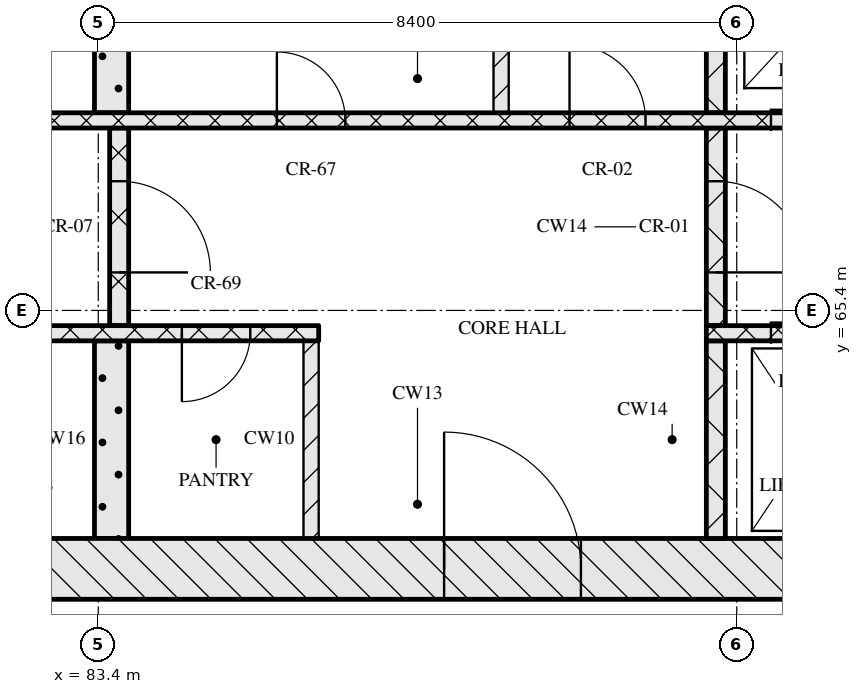
"""IFC4 building model, lengths in metres.
Left out: names, types, materials, properties, quantities, classifications, styles, units other than length and angle.
Written with IfcOpenShell. Run it as: python <this file> out.ifc"""

import sys

from ifc_helpers import new_model, si_unit, direction, frame, frame_2d, origin, place, context, subcontext, project, spatial, rectangle, extrude, element, fill, save


model = new_model("IFC4")
c1 = context("Model", 3, precision=1e-05, world=origin(), true_north=direction((0.0, 1.0)))
c2 = subcontext(c1, "Body", "Model", "MODEL_VIEW")
j1 = project(units=[si_unit("LENGTHUNIT", "METRE"), si_unit("PLANEANGLEUNIT", "RADIAN")], contexts=[c1])
p1 = place(None, origin())
s1 = spatial("IfcSite", under=j1, at=p1, CompositionType="ELEMENT")
p2 = place(p1, origin())
s2 = spatial("IfcBuilding", under=s1, at=p2, CompositionType="ELEMENT")
p3 = place(p2, frame((0.0, 0.0, 190.65)))
s3 = spatial("IfcBuildingStorey", under=s2, at=p3, CompositionType="ELEMENT", Elevation=190.65)
p4 = place(p3, frame((67.0, 62.0, 0.0), z_axis=(0.0, 0.0, 1.0), x_axis=(1.0, 0.0, 0.0)))
e1 = element("IfcWall", 1, at=p4, inside=s3, PredefinedType="SOLIDWALL", context=c2, shape_type="SweptSolid", body=[
    extrude(rectangle(XDim=41.2, YDim=0.8, at=frame_2d((20.6, 0.0))), origin(), (0.0, 0.0, 1.0), 3.3),
])
p5 = place(p4, frame((20.95, 0.0, 0.0)))
e2 = element("IfcOpeningElement", 2, at=p5, cuts=e1, PredefinedType="OPENING", context=c2, shape_type="SweptSolid", body=[
    extrude(rectangle(XDim=1.8, YDim=2.1, at=frame_2d((0.9, 1.05))), frame((0.0, 0.41, 0.0), z_axis=(0.0, -1.0, 0.0), x_axis=(1.0, 0.0, 0.0)), (0.0, 0.0, 1.0), 0.82),
])
p6 = place(p3, frame((83.575, 62.4, 0.0), z_axis=(0.0, 0.0, 1.0), x_axis=(0.0, 1.0, 0.0)))
e3 = element("IfcWall", 3, at=p6, inside=s3, PredefinedType="SOLIDWALL", context=c2, shape_type="SweptSolid", body=[
    extrude(rectangle(XDim=2.6, YDim=0.45, at=frame_2d((1.3, 0.0))), origin(), (0.0, 0.0, 1.0), 3.3),
])
p7 = place(p3, frame((86.2, 62.4, 0.0), z_axis=(0.0, 0.0, 1.0), x_axis=(0.0, 1.0, 0.0)))
e4 = element("IfcWall", 4, at=p7, inside=s3, PredefinedType="PARTITIONING", context=c2, shape_type="SweptSolid", body=[
    extrude(rectangle(XDim=2.6, YDim=0.2, at=frame_2d((1.3, 0.0))), origin(), (0.0, 0.0, 1.0), 3.3),
])
p8 = place(p3, frame((91.525, 62.4, 0.0), z_axis=(0.0, 0.0, 1.0), x_axis=(0.0, 1.0, 0.0)))
e5 = element("IfcWall", 5, at=p8, inside=s3, PredefinedType="SOLIDWALL", context=c2, shape_type="SweptSolid", body=[
    extrude(rectangle(XDim=2.6, YDim=0.25, at=frame_2d((1.3, 0.0))), origin(), (0.0, 0.0, 1.0), 3.3),
])
p9 = place(p3, frame((67.8, 65.1, 0.0), z_axis=(0.0, 0.0, 1.0), x_axis=(1.0, 0.0, 0.0)))
e6 = element("IfcWall", 6, at=p9, inside=s3, PredefinedType="SOLIDWALL", context=c2, shape_type="SweptSolid", body=[
    extrude(rectangle(XDim=18.5, YDim=0.2, at=frame_2d((9.25, 0.0))), origin(), (0.0, 0.0, 1.0), 3.3),
])
p10 = place(p9, frame((7.27, 0.0, 0.0)))
e7 = element("IfcOpeningElement", 7, at=p10, cuts=e6, PredefinedType="OPENING", context=c2, shape_type="SweptSolid", body=[
    extrude(rectangle(XDim=0.9, YDim=2.1, at=frame_2d((0.45, 1.05))), frame((0.0, 0.11, 0.0), z_axis=(0.0, -1.0, 0.0), x_axis=(1.0, 0.0, 0.0)), (0.0, 0.0, 1.0), 0.22),
])
p11 = place(p9, frame((8.95, 0.0, 0.0)))
e8 = element("IfcOpeningElement", 8, at=p11, cuts=e6, PredefinedType="OPENING", context=c2, shape_type="SweptSolid", body=[
    extrude(rectangle(XDim=0.9, YDim=2.1, at=frame_2d((0.45, 1.05))), frame((0.0, 0.11, 0.0), z_axis=(0.0, -1.0, 0.0), x_axis=(1.0, 0.0, 0.0)), (0.0, 0.0, 1.0), 0.22),
])
p12 = place(p9, frame((11.42, 0.0, 0.0)))
e9 = element("IfcOpeningElement", 9, at=p12, cuts=e6, PredefinedType="OPENING", context=c2, shape_type="SweptSolid", body=[
    extrude(rectangle(XDim=0.9, YDim=2.1, at=frame_2d((0.45, 1.05))), frame((0.0, 0.11, 0.0), z_axis=(0.0, -1.0, 0.0), x_axis=(1.0, 0.0, 0.0)), (0.0, 0.0, 1.0), 0.22),
])
p13 = place(p9, frame((13.92, 0.0, 0.0)))
e10 = element("IfcOpeningElement", 10, at=p13, cuts=e6, PredefinedType="OPENING", context=c2, shape_type="SweptSolid", body=[
    extrude(rectangle(XDim=0.9, YDim=2.1, at=frame_2d((0.45, 1.05))), frame((0.0, 0.11, 0.0), z_axis=(0.0, -1.0, 0.0), x_axis=(1.0, 0.0, 0.0)), (0.0, 0.0, 1.0), 0.22),
])
p14 = place(p9, frame((16.7, 0.0, 0.0)))
e11 = element("IfcOpeningElement", 11, at=p14, cuts=e6, PredefinedType="OPENING", context=c2, shape_type="SweptSolid", body=[
    extrude(rectangle(XDim=0.9, YDim=2.1, at=frame_2d((0.45, 1.05))), frame((0.0, 0.11, 0.0), z_axis=(0.0, -1.0, 0.0), x_axis=(1.0, 0.0, 0.0)), (0.0, 0.0, 1.0), 0.22),
])
p15 = place(p3, frame((91.4, 65.1, 0.0), z_axis=(0.0, 0.0, 1.0), x_axis=(1.0, 0.0, 0.0)))
e12 = element("IfcWall", 12, at=p15, inside=s3, PredefinedType="SOLIDWALL", context=c2, shape_type="SweptSolid", body=[
    extrude(rectangle(XDim=16.0, YDim=0.2, at=frame_2d((8.0, 0.0))), origin(), (0.0, 0.0, 1.0), 3.3),
])
p16 = place(p15, frame((0.85, 0.0, 0.0)))
e13 = element("IfcOpeningElement", 13, at=p16, cuts=e12, PredefinedType="OPENING", context=c2, shape_type="SweptSolid", body=[
    extrude(rectangle(XDim=1.1, YDim=2.1, at=frame_2d((0.55, 1.05))), frame((0.0, 0.11, 0.0), z_axis=(0.0, -1.0, 0.0), x_axis=(1.0, 0.0, 0.0)), (0.0, 0.0, 1.0), 0.22),
])
p17 = place(p15, frame((3.35, 0.0, 0.0)))
e14 = element("IfcOpeningElement", 14, at=p17, cuts=e12, PredefinedType="OPENING", context=c2, shape_type="SweptSolid", body=[
    extrude(rectangle(XDim=1.1, YDim=2.1, at=frame_2d((0.55, 1.05))), frame((0.0, 0.11, 0.0), z_axis=(0.0, -1.0, 0.0), x_axis=(1.0, 0.0, 0.0)), (0.0, 0.0, 1.0), 0.22),
])
p18 = place(p15, frame((5.85, 0.0, 0.0)))
e15 = element("IfcOpeningElement", 15, at=p18, cuts=e12, PredefinedType="OPENING", context=c2, shape_type="SweptSolid", body=[
    extrude(rectangle(XDim=1.1, YDim=2.1, at=frame_2d((0.55, 1.05))), frame((0.0, 0.11, 0.0), z_axis=(0.0, -1.0, 0.0), x_axis=(1.0, 0.0, 0.0)), (0.0, 0.0, 1.0), 0.22),
])
p19 = place(p15, frame((7.83, 0.0, 0.0)))
e16 = element("IfcOpeningElement", 16, at=p19, cuts=e12, PredefinedType="OPENING", context=c2, shape_type="SweptSolid", body=[
    extrude(rectangle(XDim=0.9, YDim=2.1, at=frame_2d((0.45, 1.05))), frame((0.0, 0.11, 0.0), z_axis=(0.0, -1.0, 0.0), x_axis=(1.0, 0.0, 0.0)), (0.0, 0.0, 1.0), 0.22),
])
p20 = place(p3, frame((83.675, 65.2, 0.0), z_axis=(0.0, 0.0, 1.0), x_axis=(0.0, 1.0, 0.0)))
e17 = element("IfcWall", 17, at=p20, inside=s3, PredefinedType="SOLIDWALL", context=c2, shape_type="SweptSolid", body=[
    extrude(rectangle(XDim=2.6, YDim=0.25, at=frame_2d((1.3, 0.0))), origin(), (0.0, 0.0, 1.0), 3.3),
])
p21 = place(p20, frame((0.7, 0.0, 0.0)))
e18 = element("IfcOpeningElement", 18, at=p21, cuts=e17, PredefinedType="OPENING", context=c2, shape_type="SweptSolid", body=[
    extrude(rectangle(XDim=1.2, YDim=2.1, at=frame_2d((0.6, 1.05))), frame((0.0, 0.135, 0.0), z_axis=(0.0, -1.0, 0.0), x_axis=(1.0, 0.0, 0.0)), (0.0, 0.0, 1.0), 0.27),
])
p22 = place(p3, frame((91.525, 65.2, 0.0), z_axis=(0.0, 0.0, 1.0), x_axis=(0.0, 1.0, 0.0)))
e19 = element("IfcWall", 19, at=p22, inside=s3, PredefinedType="SOLIDWALL", context=c2, shape_type="SweptSolid", body=[
    extrude(rectangle(XDim=2.6, YDim=0.25, at=frame_2d((1.3, 0.0))), origin(), (0.0, 0.0, 1.0), 3.3),
])
p23 = place(p22, frame((0.7, 0.0, 0.0)))
e20 = element("IfcOpeningElement", 20, at=p23, cuts=e19, PredefinedType="OPENING", context=c2, shape_type="SweptSolid", body=[
    extrude(rectangle(XDim=1.2, YDim=2.1, at=frame_2d((0.6, 1.05))), frame((0.0, 0.135, 0.0), z_axis=(0.0, -1.0, 0.0), x_axis=(1.0, 0.0, 0.0)), (0.0, 0.0, 1.0), 0.27),
])
p24 = place(p3, frame((76.05, 67.9, 0.0), z_axis=(0.0, 0.0, 1.0), x_axis=(1.0, 0.0, 0.0)))
e21 = element("IfcWall", 21, at=p24, inside=s3, PredefinedType="SOLIDWALL", context=c2, shape_type="SweptSolid", body=[
    extrude(rectangle(XDim=23.1, YDim=0.2, at=frame_2d((11.55, 0.0))), origin(), (0.0, 0.0, 1.0), 3.3),
])
p25 = place(p24, frame((1.95, 0.0, 0.0)))
e22 = element("IfcOpeningElement", 22, at=p25, cuts=e21, PredefinedType="OPENING", context=c2, shape_type="SweptSolid", body=[
    extrude(rectangle(XDim=0.9, YDim=2.1, at=frame_2d((0.45, 1.05))), frame((0.0, 0.11, 0.0), z_axis=(0.0, -1.0, 0.0), x_axis=(1.0, 0.0, 0.0)), (0.0, 0.0, 1.0), 0.22),
])
p26 = place(p24, frame((5.66, 0.0, 0.0)))
e23 = element("IfcOpeningElement", 23, at=p26, cuts=e21, PredefinedType="OPENING", context=c2, shape_type="SweptSolid", body=[
    extrude(rectangle(XDim=0.9, YDim=2.1, at=frame_2d((0.45, 1.05))), frame((0.0, 0.11, 0.0), z_axis=(0.0, -1.0, 0.0), x_axis=(1.0, 0.0, 0.0)), (0.0, 0.0, 1.0), 0.22),
])
p27 = place(p24, frame((9.7, 0.0, 0.0)))
e24 = element("IfcOpeningElement", 24, at=p27, cuts=e21, PredefinedType="OPENING", context=c2, shape_type="SweptSolid", body=[
    extrude(rectangle(XDim=0.9, YDim=2.1, at=frame_2d((0.45, 1.05))), frame((0.0, 0.11, 0.0), z_axis=(0.0, -1.0, 0.0), x_axis=(1.0, 0.0, 0.0)), (0.0, 0.0, 1.0), 0.22),
])
p28 = place(p24, frame((13.55, 0.0, 0.0)))
e25 = element("IfcOpeningElement", 25, at=p28, cuts=e21, PredefinedType="OPENING", context=c2, shape_type="SweptSolid", body=[
    extrude(rectangle(XDim=1.0, YDim=2.1, at=frame_2d((0.5, 1.05))), frame((0.0, 0.11, 0.0), z_axis=(0.0, -1.0, 0.0), x_axis=(1.0, 0.0, 0.0)), (0.0, 0.0, 1.0), 0.22),
])
p29 = place(p24, frame((16.2, 0.0, 0.0)))
e26 = element("IfcOpeningElement", 26, at=p29, cuts=e21, PredefinedType="OPENING", context=c2, shape_type="SweptSolid", body=[
    extrude(rectangle(XDim=1.1, YDim=2.1, at=frame_2d((0.55, 1.05))), frame((0.0, 0.11, 0.0), z_axis=(0.0, -1.0, 0.0), x_axis=(1.0, 0.0, 0.0)), (0.0, 0.0, 1.0), 0.22),
])
p30 = place(p24, frame((18.7, 0.0, 0.0)))
e27 = element("IfcOpeningElement", 27, at=p30, cuts=e21, PredefinedType="OPENING", context=c2, shape_type="SweptSolid", body=[
    extrude(rectangle(XDim=1.1, YDim=2.1, at=frame_2d((0.55, 1.05))), frame((0.0, 0.11, 0.0), z_axis=(0.0, -1.0, 0.0), x_axis=(1.0, 0.0, 0.0)), (0.0, 0.0, 1.0), 0.22),
])
p31 = place(p24, frame((21.2, 0.0, 0.0)))
e28 = element("IfcOpeningElement", 28, at=p31, cuts=e21, PredefinedType="OPENING", context=c2, shape_type="SweptSolid", body=[
    extrude(rectangle(XDim=1.1, YDim=2.1, at=frame_2d((0.55, 1.05))), frame((0.0, 0.11, 0.0), z_axis=(0.0, -1.0, 0.0), x_axis=(1.0, 0.0, 0.0)), (0.0, 0.0, 1.0), 0.22),
])
p32 = place(p3, frame((83.575, 68.0, 0.0), z_axis=(0.0, 0.0, 1.0), x_axis=(0.0, 1.0, 0.0)))
e29 = element("IfcWall", 29, at=p32, inside=s3, PredefinedType="SOLIDWALL", context=c2, shape_type="SweptSolid", body=[
    extrude(rectangle(XDim=2.6, YDim=0.45, at=frame_2d((1.3, 0.0))), origin(), (0.0, 0.0, 1.0), 3.3),
])
p33 = place(p3, frame((88.7, 68.0, 0.0), z_axis=(0.0, 0.0, 1.0), x_axis=(0.0, 1.0, 0.0)))
e30 = element("IfcWall", 30, at=p33, inside=s3, PredefinedType="PARTITIONING", context=c2, shape_type="SweptSolid", body=[
    extrude(rectangle(XDim=2.6, YDim=0.2, at=frame_2d((1.3, 0.0))), origin(), (0.0, 0.0, 1.0), 3.3),
])
p34 = place(p3, frame((91.525, 68.0, 0.0), z_axis=(0.0, 0.0, 1.0), x_axis=(0.0, 1.0, 0.0)))
e31 = element("IfcWall", 31, at=p34, inside=s3, PredefinedType="SOLIDWALL", context=c2, shape_type="SweptSolid", body=[
    extrude(rectangle(XDim=2.6, YDim=0.25, at=frame_2d((1.3, 0.0))), origin(), (0.0, 0.0, 1.0), 3.3),
])
p35 = place(p5, origin())
e32 = element("IfcDoor", 32, at=p35, inside=s3, OperationType="DOUBLE_DOOR_SINGLE_SWING", PredefinedType="DOOR", context=c2, shape_type="SweptSolid", body=[
    extrude(rectangle(XDim=1.8, YDim=2.1, at=frame_2d((0.9, 1.05))), frame((0.0, 0.025, 0.0), z_axis=(0.0, -1.0, 0.0), x_axis=(1.0, 0.0, 0.0)), (0.0, 0.0, 1.0), 0.05),
])
fill(e2, e32)
p36 = place(p14, origin())
e33 = element("IfcDoor", 33, at=p36, inside=s3, OperationType="SINGLE_SWING_RIGHT", PredefinedType="DOOR", context=c2, shape_type="SweptSolid", body=[
    extrude(rectangle(XDim=0.9, YDim=2.1, at=frame_2d((0.45, 1.05))), frame((0.0, 0.025, 0.0), z_axis=(0.0, -1.0, 0.0), x_axis=(1.0, 0.0, 0.0)), (0.0, 0.0, 1.0), 0.05),
])
fill(e11, e33)
p37 = place(p16, origin())
e34 = element("IfcDoor", 34, at=p37, inside=s3, OperationType="SLIDING_TO_LEFT", PredefinedType="DOOR", context=c2, shape_type="SweptSolid", body=[
    extrude(rectangle(XDim=1.1, YDim=2.1, at=frame_2d((0.55, 1.05))), frame((0.0, 0.025, 0.0), z_axis=(0.0, -1.0, 0.0), x_axis=(1.0, 0.0, 0.0)), (0.0, 0.0, 1.0), 0.05),
])
fill(e13, e34)
p38 = place(p21, origin())
e35 = element("IfcDoor", 35, at=p38, inside=s3, OperationType="SINGLE_SWING_RIGHT", PredefinedType="DOOR", context=c2, shape_type="SweptSolid", body=[
    extrude(rectangle(XDim=1.2, YDim=2.1, at=frame_2d((0.6, 1.05))), frame((0.0, 0.025, 0.0), z_axis=(0.0, -1.0, 0.0), x_axis=(1.0, 0.0, 0.0)), (0.0, 0.0, 1.0), 0.05),
])
fill(e18, e35)
p39 = place(p23, origin())
e36 = element("IfcDoor", 36, at=p39, inside=s3, OperationType="SINGLE_SWING_RIGHT", PredefinedType="DOOR", context=c2, shape_type="SweptSolid", body=[
    extrude(rectangle(XDim=1.2, YDim=2.1, at=frame_2d((0.6, 1.05))), frame((0.0, 0.025, 0.0), z_axis=(0.0, -1.0, 0.0), x_axis=(1.0, 0.0, 0.0)), (0.0, 0.0, 1.0), 0.05),
])
fill(e20, e36)
p40 = place(p27, origin())
e37 = element("IfcDoor", 37, at=p40, inside=s3, OperationType="SINGLE_SWING_LEFT", PredefinedType="DOOR", context=c2, shape_type="SweptSolid", body=[
    extrude(rectangle(XDim=0.9, YDim=2.1, at=frame_2d((0.45, 1.05))), frame((0.0, 0.025, 0.0), z_axis=(0.0, -1.0, 0.0), x_axis=(1.0, 0.0, 0.0)), (0.0, 0.0, 1.0), 0.05),
])
fill(e24, e37)
p41 = place(p28, origin())
e38 = element("IfcDoor", 38, at=p41, inside=s3, OperationType="SINGLE_SWING_LEFT", PredefinedType="DOOR", context=c2, shape_type="SweptSolid", body=[
    extrude(rectangle(XDim=1.0, YDim=2.1, at=frame_2d((0.5, 1.05))), frame((0.0, 0.025, 0.0), z_axis=(0.0, -1.0, 0.0), x_axis=(1.0, 0.0, 0.0)), (0.0, 0.0, 1.0), 0.05),
])
fill(e25, e38)
p42 = place(p29, origin())
e39 = element("IfcDoor", 39, at=p42, inside=s3, OperationType="SLIDING_TO_RIGHT", PredefinedType="DOOR", context=c2, shape_type="SweptSolid", body=[
    extrude(rectangle(XDim=1.1, YDim=2.1, at=frame_2d((0.55, 1.05))), frame((0.0, 0.025, 0.0), z_axis=(0.0, -1.0, 0.0), x_axis=(1.0, 0.0, 0.0)), (0.0, 0.0, 1.0), 0.05),
])
fill(e26, e39)
save(model, sys.argv[1])
